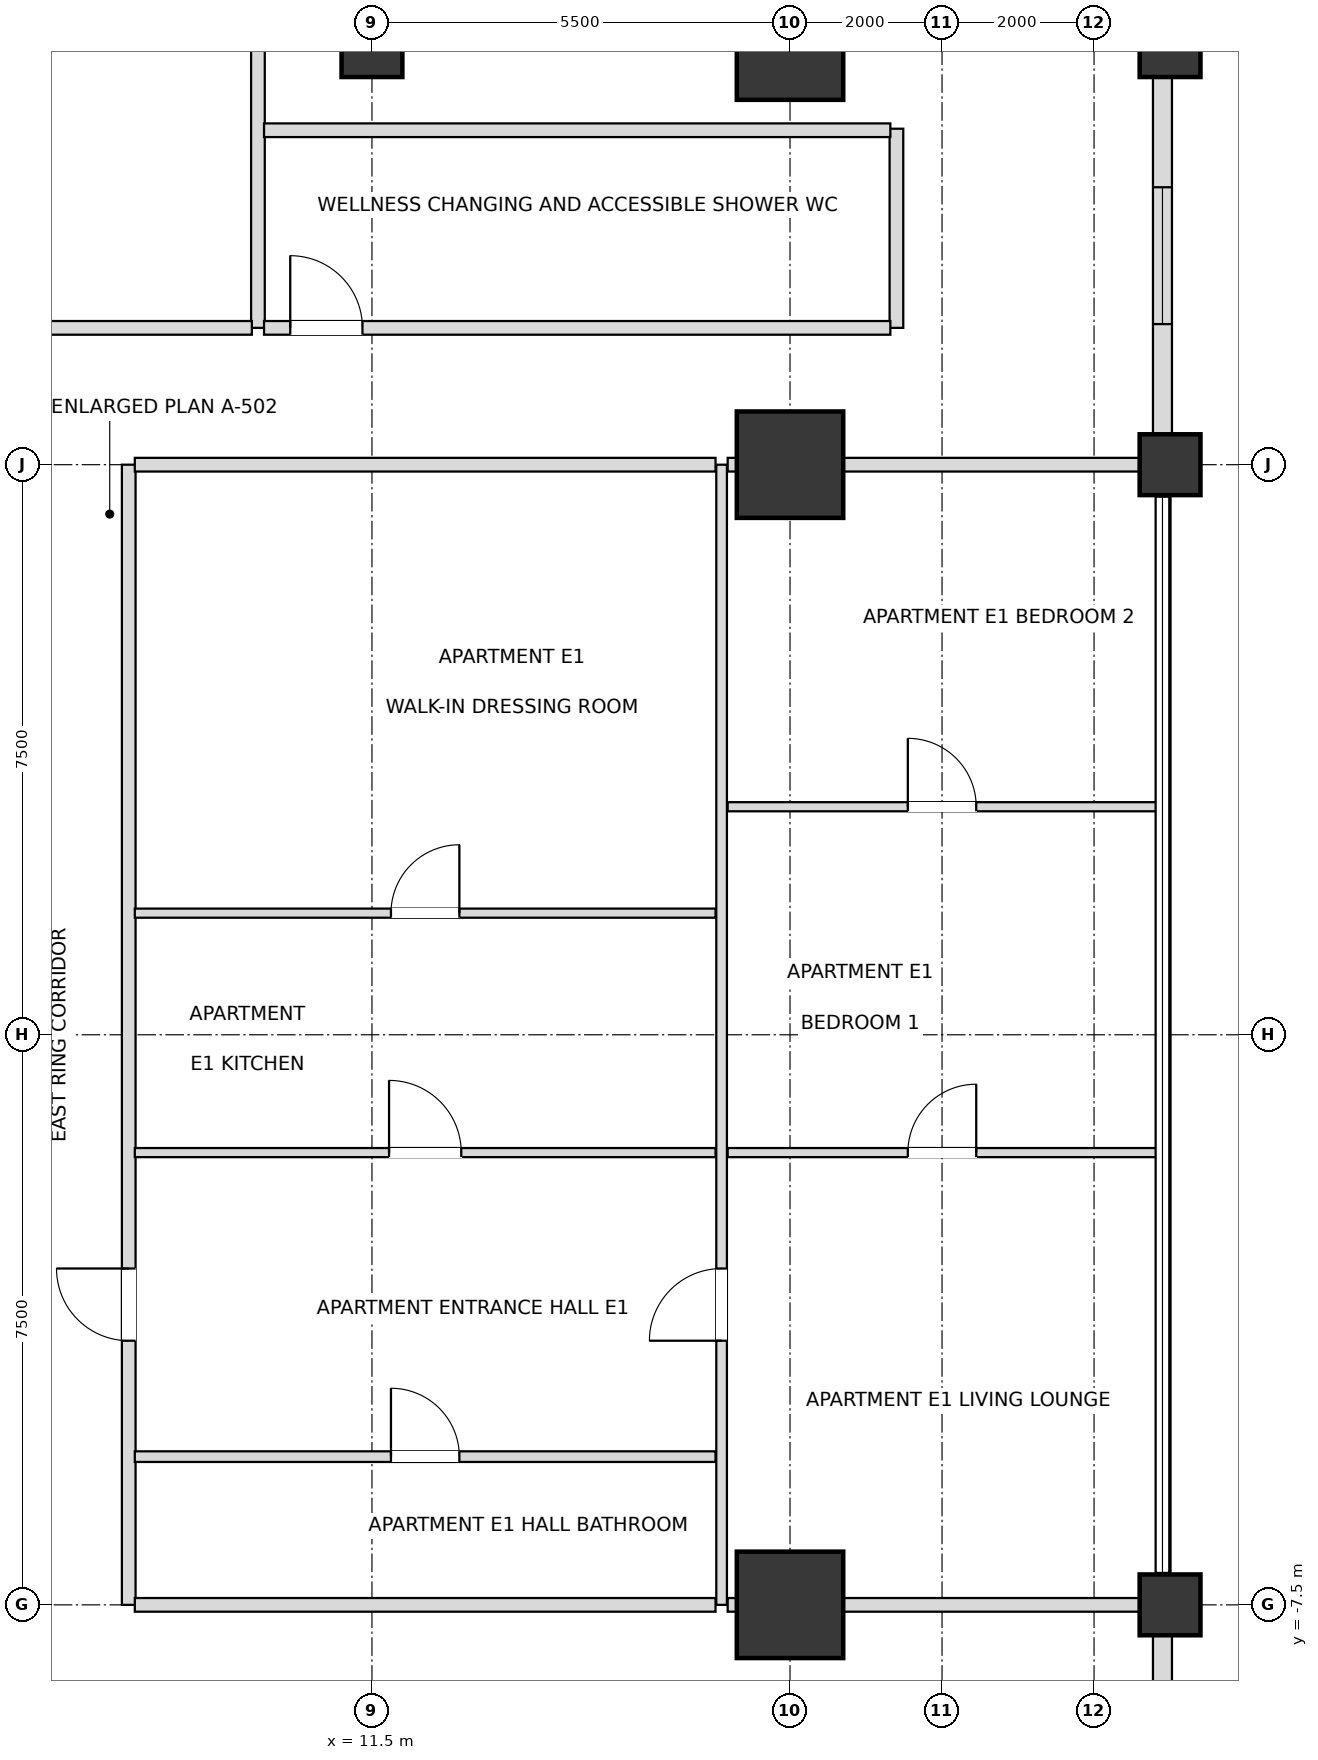
"""IFC4 building model, lengths in metres.
Left out: names, types, materials, properties, quantities, classifications, styles, units other than length and angle.
Written with IfcOpenShell. Run it as: python <this file> out.ifc"""

import sys

from ifc_helpers import new_model, si_unit, direction, frame, frame_2d, origin, origin_2d, place, context, subcontext, project, spatial, rectangle, extrude, element, fill, save


model = new_model("IFC4")
c1 = context("Model", 3, precision=1e-05, world=origin(), true_north=direction((0.0, 1.0)))
c2 = subcontext(c1, "Body", "Model", "MODEL_VIEW")
j1 = project(units=[si_unit("LENGTHUNIT", "METRE"), si_unit("PLANEANGLEUNIT", "RADIAN")], contexts=[c1])
p1 = place(None, origin())
s1 = spatial("IfcSite", under=j1, at=p1, CompositionType="ELEMENT")
p2 = place(p1, origin())
s2 = spatial("IfcBuilding", under=s1, at=p2, CompositionType="ELEMENT")
p3 = place(p2, frame((0.0, 0.0, 36.0)))
s3 = spatial("IfcBuildingStorey", under=s2, at=p3, CompositionType="ELEMENT", Elevation=36.0)
for number, where, z_axis, x_axis in (
    (1, (17.0, -7.5, 0.0), (0.0, 0.0, 1.0), (1.0, 0.0, 0.0)),
    (2, (17.0, 7.5, 0.0), (0.0, 0.0, 1.0), (1.0, 0.0, 0.0)),
    (3, (17.0, 13.0, 0.0), (0.0, 0.0, 1.0), (1.0, 0.0, 0.0)),
):
    element("IfcColumn", number, at=place(p3, frame(where, z_axis=z_axis, x_axis=x_axis)), inside=s3, PredefinedType="USERDEFINED", context=c2, shape_type="SweptSolid", body=[
        extrude(rectangle(XDim=1.4, YDim=1.4, at=origin_2d()), origin(), (0.0, 0.0, 1.0), 3.6),
    ])
for number, where, z_axis, x_axis in (
    (4, (11.5, 13.0, 0.0), (0.0, 0.0, 1.0), (1.0, 0.0, 0.0)),
    (5, (22.0, -7.5, 0.0), (0.0, 0.0, 1.0), (1.0, 0.0, 0.0)),
    (6, (22.0, 7.5, 0.0), (0.0, 0.0, 1.0), (1.0, 0.0, 0.0)),
    (7, (22.0, 13.0, 0.0), (0.0, 0.0, 1.0), (1.0, 0.0, 0.0)),
):
    element("IfcColumn", number, at=place(p3, frame(where, z_axis=z_axis, x_axis=x_axis)), inside=s3, PredefinedType="COLUMN", context=c2, shape_type="SweptSolid", body=[
        extrude(rectangle(XDim=0.8, YDim=0.8, at=origin_2d()), origin(), (0.0, 0.0, 1.0), 3.6),
    ])
p4 = place(p3, frame((21.9, -12.605, 0.0), z_axis=(0.0, 0.0, 1.0), x_axis=(0.0, 1.0, 0.0)))
e8 = element("IfcWall", 8, at=p4, inside=s3, PredefinedType="SOLIDWALL", context=c2, shape_type="SweptSolid", body=[
    extrude(rectangle(XDim=4.71, YDim=0.25, at=frame_2d((2.355, 0.0))), origin(), (0.0, 0.0, 1.0), 2.736),
])
p5 = place(p4, frame((1.455, 0.0, 0.72)))
e9 = element("IfcOpeningElement", 9, at=p5, cuts=e8, PredefinedType="OPENING", context=c2, shape_type="SweptSolid", body=[
    extrude(rectangle(XDim=1.8, YDim=1.68, at=frame_2d((0.9, 0.84))), frame((0.0, 0.135, 0.0), z_axis=(0.0, -1.0, 0.0), x_axis=(1.0, 0.0, 0.0)), (0.0, 0.0, 1.0), 0.27),
])
p6 = place(p3, frame((21.9, 7.895, 0.0), z_axis=(0.0, 0.0, 1.0), x_axis=(0.0, 1.0, 0.0)))
e10 = element("IfcWall", 10, at=p6, inside=s3, PredefinedType="SOLIDWALL", context=c2, shape_type="SweptSolid", body=[
    extrude(rectangle(XDim=4.71, YDim=0.25, at=frame_2d((2.355, 0.0))), origin(), (0.0, 0.0, 1.0), 2.736),
])
p7 = place(p6, frame((1.455, 0.0, 0.72)))
e11 = element("IfcOpeningElement", 11, at=p7, cuts=e10, PredefinedType="OPENING", context=c2, shape_type="SweptSolid", body=[
    extrude(rectangle(XDim=1.8, YDim=1.68, at=frame_2d((0.9, 0.84))), frame((0.0, 0.135, 0.0), z_axis=(0.0, -1.0, 0.0), x_axis=(1.0, 0.0, 0.0)), (0.0, 0.0, 1.0), 0.27),
])
p8 = place(p3, frame((8.3, -7.5, 0.0), z_axis=(0.0, 0.0, 1.0), x_axis=(0.0, 1.0, 0.0)))
e12 = element("IfcWall", 12, at=p8, inside=s3, PredefinedType="PARTITIONING", context=c2, shape_type="SweptSolid", body=[
    extrude(rectangle(XDim=15.0, YDim=0.18, at=frame_2d((7.5, 0.0))), origin(), (0.0, 0.0, 1.0), 3.38),
])
p9 = place(p8, frame((3.475, 0.0, 0.0)))
e13 = element("IfcOpeningElement", 13, at=p9, cuts=e12, PredefinedType="OPENING", context=c2, shape_type="SweptSolid", body=[
    extrude(rectangle(XDim=0.95, YDim=2.15, at=frame_2d((0.475, 1.075))), frame((0.0, 0.1, 0.0), z_axis=(0.0, -1.0, 0.0), x_axis=(1.0, 0.0, 0.0)), (0.0, 0.0, 1.0), 0.2),
])
p10 = place(p3, frame((10.0, 9.3, 0.0), z_axis=(0.0, 0.0, 1.0), x_axis=(0.0, 1.0, 0.0)))
e14 = element("IfcWall", 14, at=p10, inside=s3, PredefinedType="PARTITIONING", context=c2, shape_type="SweptSolid", body=[
    extrude(rectangle(XDim=15.6, YDim=0.18, at=frame_2d((7.8, 0.0))), origin(), (0.0, 0.0, 1.0), 2.816),
])
p11 = place(p10, frame((8.635, 0.0, 0.0)))
e15 = element("IfcOpeningElement", 15, at=p11, cuts=e14, PredefinedType="OPENING", context=c2, shape_type="SweptSolid", body=[
    extrude(rectangle(XDim=0.95, YDim=2.15, at=frame_2d((0.475, 1.075))), frame((0.0, 0.1, 0.0), z_axis=(0.0, -1.0, 0.0), x_axis=(1.0, 0.0, 0.0)), (0.0, 0.0, 1.0), 0.2),
])
p12 = place(p3, frame((16.1, -7.5, 0.0), z_axis=(0.0, 0.0, 1.0), x_axis=(0.0, 1.0, 0.0)))
e16 = element("IfcWall", 16, at=p12, inside=s3, PredefinedType="PARTITIONING", context=c2, shape_type="SweptSolid", body=[
    extrude(rectangle(XDim=15.0, YDim=0.14, at=frame_2d((7.5, 0.0))), origin(), (0.0, 0.0, 1.0), 3.38),
])
p13 = place(p12, frame((3.475, 0.0, 0.0)))
e17 = element("IfcOpeningElement", 17, at=p13, cuts=e16, PredefinedType="OPENING", context=c2, shape_type="SweptSolid", body=[
    extrude(rectangle(XDim=0.95, YDim=2.1, at=frame_2d((0.475, 1.05))), frame((0.0, 0.08, 0.0), z_axis=(0.0, -1.0, 0.0), x_axis=(1.0, 0.0, 0.0)), (0.0, 0.0, 1.0), 0.16),
])
p14 = place(p3, frame((18.4, 9.3, 0.0), z_axis=(0.0, 0.0, 1.0), x_axis=(0.0, 1.0, 0.0)))
e18 = element("IfcWall", 18, at=p14, inside=s3, PredefinedType="PARTITIONING", context=c2, shape_type="SweptSolid", body=[
    extrude(rectangle(XDim=2.62, YDim=0.18, at=frame_2d((1.31, 0.0))), origin(), (0.0, 0.0, 1.0), 3.38),
])
p15 = place(p3, frame((8.38, -7.5, 0.0), z_axis=(0.0, 0.0, 1.0), x_axis=(1.0, 0.0, 0.0)))
e19 = element("IfcWall", 19, at=p15, inside=s3, PredefinedType="PARTITIONING", context=c2, shape_type="SweptSolid", body=[
    extrude(rectangle(XDim=7.64, YDim=0.18, at=frame_2d((3.82, 0.0))), origin(), (0.0, 0.0, 1.0), 2.816),
])
p16 = place(p3, frame((16.18, -7.5, 0.0), z_axis=(0.0, 0.0, 1.0), x_axis=(1.0, 0.0, 0.0)))
e20 = element("IfcWall", 20, at=p16, inside=s3, PredefinedType="PARTITIONING", context=c2, shape_type="SweptSolid", body=[
    extrude(rectangle(XDim=5.72, YDim=0.18, at=frame_2d((2.86, 0.0))), origin(), (0.0, 0.0, 1.0), 2.816),
])
p17 = place(p3, frame((8.38, -5.55, 0.0), z_axis=(0.0, 0.0, 1.0), x_axis=(1.0, 0.0, 0.0)))
e21 = element("IfcWall", 21, at=p17, inside=s3, PredefinedType="PARTITIONING", context=c2, shape_type="SweptSolid", body=[
    extrude(rectangle(XDim=7.64, YDim=0.14, at=frame_2d((3.82, 0.0))), origin(), (0.0, 0.0, 1.0), 2.948),
])
p18 = place(p17, frame((3.37, 0.0, 0.0)))
e22 = element("IfcOpeningElement", 22, at=p18, cuts=e21, PredefinedType="OPENING", context=c2, shape_type="SweptSolid", body=[
    extrude(rectangle(XDim=0.9, YDim=2.1, at=frame_2d((0.45, 1.05))), frame((0.0, 0.08, 0.0), z_axis=(0.0, -1.0, 0.0), x_axis=(1.0, 0.0, 0.0)), (0.0, 0.0, 1.0), 0.16),
])
p19 = place(p3, frame((8.38, -1.55, 0.0), z_axis=(0.0, 0.0, 1.0), x_axis=(1.0, 0.0, 0.0)))
e23 = element("IfcWall", 23, at=p19, inside=s3, PredefinedType="PARTITIONING", context=c2, shape_type="SweptSolid", body=[
    extrude(rectangle(XDim=7.64, YDim=0.12, at=frame_2d((3.82, 0.0))), origin(), (0.0, 0.0, 1.0), 2.948),
])
p20 = place(p19, frame((3.345, 0.0, 0.0)))
e24 = element("IfcOpeningElement", 24, at=p20, cuts=e23, PredefinedType="OPENING", context=c2, shape_type="SweptSolid", body=[
    extrude(rectangle(XDim=0.95, YDim=2.1, at=frame_2d((0.475, 1.05))), frame((0.0, 0.07, 0.0), z_axis=(0.0, -1.0, 0.0), x_axis=(1.0, 0.0, 0.0)), (0.0, 0.0, 1.0), 0.14),
])
p21 = place(p3, frame((16.18, -1.55, 0.0), z_axis=(0.0, 0.0, 1.0), x_axis=(1.0, 0.0, 0.0)))
e25 = element("IfcWall", 25, at=p21, inside=s3, PredefinedType="PARTITIONING", context=c2, shape_type="SweptSolid", body=[
    extrude(rectangle(XDim=5.64, YDim=0.12, at=frame_2d((2.82, 0.0))), origin(), (0.0, 0.0, 1.0), 2.816),
])
p22 = place(p21, frame((2.37, 0.0, 0.0)))
e26 = element("IfcOpeningElement", 26, at=p22, cuts=e25, PredefinedType="OPENING", context=c2, shape_type="SweptSolid", body=[
    extrude(rectangle(XDim=0.9, YDim=2.1, at=frame_2d((0.45, 1.05))), frame((0.0, 0.07, 0.0), z_axis=(0.0, -1.0, 0.0), x_axis=(1.0, 0.0, 0.0)), (0.0, 0.0, 1.0), 0.14),
])
p23 = place(p3, frame((8.38, 1.6, 0.0), z_axis=(0.0, 0.0, 1.0), x_axis=(1.0, 0.0, 0.0)))
e27 = element("IfcWall", 27, at=p23, inside=s3, PredefinedType="PARTITIONING", context=c2, shape_type="SweptSolid", body=[
    extrude(rectangle(XDim=7.64, YDim=0.12, at=frame_2d((3.82, 0.0))), origin(), (0.0, 0.0, 1.0), 2.948),
])
p24 = place(p23, frame((3.37, 0.0, 0.0)))
e28 = element("IfcOpeningElement", 28, at=p24, cuts=e27, PredefinedType="OPENING", context=c2, shape_type="SweptSolid", body=[
    extrude(rectangle(XDim=0.9, YDim=2.1, at=frame_2d((0.45, 1.05))), frame((0.0, 0.07, 0.0), z_axis=(0.0, -1.0, 0.0), x_axis=(1.0, 0.0, 0.0)), (0.0, 0.0, 1.0), 0.14),
])
p25 = place(p3, frame((16.18, 3.0, 0.0), z_axis=(0.0, 0.0, 1.0), x_axis=(1.0, 0.0, 0.0)))
e29 = element("IfcWall", 29, at=p25, inside=s3, PredefinedType="PARTITIONING", context=c2, shape_type="SweptSolid", body=[
    extrude(rectangle(XDim=5.64, YDim=0.12, at=frame_2d((2.82, 0.0))), origin(), (0.0, 0.0, 1.0), 2.816),
])
p26 = place(p25, frame((2.37, 0.0, 0.0)))
e30 = element("IfcOpeningElement", 30, at=p26, cuts=e29, PredefinedType="OPENING", context=c2, shape_type="SweptSolid", body=[
    extrude(rectangle(XDim=0.9, YDim=2.1, at=frame_2d((0.45, 1.05))), frame((0.0, 0.07, 0.0), z_axis=(0.0, -1.0, 0.0), x_axis=(1.0, 0.0, 0.0)), (0.0, 0.0, 1.0), 0.14),
])
p27 = place(p3, frame((8.38, 7.5, 0.0), z_axis=(0.0, 0.0, 1.0), x_axis=(1.0, 0.0, 0.0)))
e31 = element("IfcWall", 31, at=p27, inside=s3, PredefinedType="PARTITIONING", context=c2, shape_type="SweptSolid", body=[
    extrude(rectangle(XDim=7.64, YDim=0.18, at=frame_2d((3.82, 0.0))), origin(), (0.0, 0.0, 1.0), 2.816),
])
p28 = place(p3, frame((16.18, 7.5, 0.0), z_axis=(0.0, 0.0, 1.0), x_axis=(1.0, 0.0, 0.0)))
e32 = element("IfcWall", 32, at=p28, inside=s3, PredefinedType="PARTITIONING", context=c2, shape_type="SweptSolid", body=[
    extrude(rectangle(XDim=5.72, YDim=0.18, at=frame_2d((2.86, 0.0))), origin(), (0.0, 0.0, 1.0), 2.816),
])
p29 = place(p3, frame((-2.87, 9.3, 0.0), z_axis=(0.0, 0.0, 1.0), x_axis=(1.0, 0.0, 0.0)))
e33 = element("IfcWall", 33, at=p29, inside=s3, PredefinedType="PARTITIONING", context=c2, shape_type="SweptSolid", body=[
    extrude(rectangle(XDim=12.79, YDim=0.18, at=frame_2d((6.395, 0.0))), origin(), (0.0, 0.0, 1.0), 2.816),
])
p30 = place(p29, frame((5.925, 0.0, 0.0)))
e34 = element("IfcOpeningElement", 34, at=p30, cuts=e33, PredefinedType="OPENING", context=c2, shape_type="SweptSolid", body=[
    extrude(rectangle(XDim=0.95, YDim=2.15, at=frame_2d((0.475, 1.075))), frame((0.0, 0.1, 0.0), z_axis=(0.0, -1.0, 0.0), x_axis=(1.0, 0.0, 0.0)), (0.0, 0.0, 1.0), 0.2),
])
p31 = place(p3, frame((10.08, 9.3, 0.0), z_axis=(0.0, 0.0, 1.0), x_axis=(1.0, 0.0, 0.0)))
e35 = element("IfcWall", 35, at=p31, inside=s3, PredefinedType="PARTITIONING", context=c2, shape_type="SweptSolid", body=[
    extrude(rectangle(XDim=8.24, YDim=0.18, at=frame_2d((4.12, 0.0))), origin(), (0.0, 0.0, 1.0), 2.816),
])
p32 = place(p31, frame((0.345, 0.0, 0.0)))
e36 = element("IfcOpeningElement", 36, at=p32, cuts=e35, PredefinedType="OPENING", context=c2, shape_type="SweptSolid", body=[
    extrude(rectangle(XDim=0.95, YDim=2.15, at=frame_2d((0.475, 1.075))), frame((0.0, 0.1, 0.0), z_axis=(0.0, -1.0, 0.0), x_axis=(1.0, 0.0, 0.0)), (0.0, 0.0, 1.0), 0.2),
])
p33 = place(p3, frame((10.08, 11.9, 0.0), z_axis=(0.0, 0.0, 1.0), x_axis=(1.0, 0.0, 0.0)))
e37 = element("IfcWall", 37, at=p33, inside=s3, PredefinedType="PARTITIONING", context=c2, shape_type="SweptSolid", body=[
    extrude(rectangle(XDim=8.24, YDim=0.18, at=frame_2d((4.12, 0.0))), origin(), (0.0, 0.0, 1.0), 2.816),
])
p34 = place(p7, origin())
e38 = element("IfcWindow", 38, at=p34, inside=s3, PartitioningType="SINGLE_PANEL", PredefinedType="WINDOW", context=c2, shape_type="SweptSolid", body=[
    extrude(rectangle(XDim=1.8, YDim=1.68, at=frame_2d((0.9, 0.84))), frame((0.0, 0.03, 0.0), z_axis=(0.0, -1.0, 0.0), x_axis=(1.0, 0.0, 0.0)), (0.0, 0.0, 1.0), 0.06),
])
fill(e11, e38)
p35 = place(p32, origin())
e39 = element("IfcDoor", 39, at=p35, inside=s3, OperationType="SINGLE_SWING_LEFT", PredefinedType="DOOR", context=c2, shape_type="SweptSolid", body=[
    extrude(rectangle(XDim=0.95, YDim=2.15, at=frame_2d((0.475, 1.075))), frame((0.0, 0.025, 0.0), z_axis=(0.0, -1.0, 0.0), x_axis=(1.0, 0.0, 0.0)), (0.0, 0.0, 1.0), 0.05),
])
fill(e36, e39)
p36 = place(p18, origin())
e40 = element("IfcDoor", 40, at=p36, inside=s3, OperationType="SINGLE_SWING_LEFT", PredefinedType="DOOR", context=c2, shape_type="SweptSolid", body=[
    extrude(rectangle(XDim=0.9, YDim=2.1, at=frame_2d((0.45, 1.05))), frame((0.0, 0.025, 0.0), z_axis=(0.0, -1.0, 0.0), x_axis=(1.0, 0.0, 0.0)), (0.0, 0.0, 1.0), 0.05),
])
fill(e22, e40)
p37 = place(p9, origin())
e41 = element("IfcDoor", 41, at=p37, inside=s3, OperationType="SINGLE_SWING_RIGHT", PredefinedType="DOOR", context=c2, shape_type="SweptSolid", body=[
    extrude(rectangle(XDim=0.95, YDim=2.15, at=frame_2d((0.475, 1.075))), frame((0.0, 0.025, 0.0), z_axis=(0.0, -1.0, 0.0), x_axis=(1.0, 0.0, 0.0)), (0.0, 0.0, 1.0), 0.05),
])
fill(e13, e41)
p38 = place(p20, origin())
e42 = element("IfcDoor", 42, at=p38, inside=s3, OperationType="SINGLE_SWING_LEFT", PredefinedType="DOOR", context=c2, shape_type="SweptSolid", body=[
    extrude(rectangle(XDim=0.95, YDim=2.1, at=frame_2d((0.475, 1.05))), frame((0.0, 0.025, 0.0), z_axis=(0.0, -1.0, 0.0), x_axis=(1.0, 0.0, 0.0)), (0.0, 0.0, 1.0), 0.05),
])
fill(e24, e42)
p39 = place(p24, origin())
e43 = element("IfcDoor", 43, at=p39, inside=s3, OperationType="SINGLE_SWING_RIGHT", PredefinedType="DOOR", context=c2, shape_type="SweptSolid", body=[
    extrude(rectangle(XDim=0.9, YDim=2.1, at=frame_2d((0.45, 1.05))), frame((0.0, 0.025, 0.0), z_axis=(0.0, -1.0, 0.0), x_axis=(1.0, 0.0, 0.0)), (0.0, 0.0, 1.0), 0.05),
])
fill(e28, e43)
p40 = place(p13, origin())
e44 = element("IfcDoor", 44, at=p40, inside=s3, OperationType="SINGLE_SWING_LEFT", PredefinedType="DOOR", context=c2, shape_type="SweptSolid", body=[
    extrude(rectangle(XDim=0.95, YDim=2.1, at=frame_2d((0.475, 1.05))), frame((0.0, 0.025, 0.0), z_axis=(0.0, -1.0, 0.0), x_axis=(1.0, 0.0, 0.0)), (0.0, 0.0, 1.0), 0.05),
])
fill(e17, e44)
p41 = place(p22, origin())
e45 = element("IfcDoor", 45, at=p41, inside=s3, OperationType="SINGLE_SWING_RIGHT", PredefinedType="DOOR", context=c2, shape_type="SweptSolid", body=[
    extrude(rectangle(XDim=0.9, YDim=2.1, at=frame_2d((0.45, 1.05))), frame((0.0, 0.025, 0.0), z_axis=(0.0, -1.0, 0.0), x_axis=(1.0, 0.0, 0.0)), (0.0, 0.0, 1.0), 0.05),
])
fill(e26, e45)
p42 = place(p26, origin())
e46 = element("IfcDoor", 46, at=p42, inside=s3, OperationType="SINGLE_SWING_LEFT", PredefinedType="DOOR", context=c2, shape_type="SweptSolid", body=[
    extrude(rectangle(XDim=0.9, YDim=2.1, at=frame_2d((0.45, 1.05))), frame((0.0, 0.025, 0.0), z_axis=(0.0, -1.0, 0.0), x_axis=(1.0, 0.0, 0.0)), (0.0, 0.0, 1.0), 0.05),
])
fill(e30, e46)
save(model, sys.argv[1])
